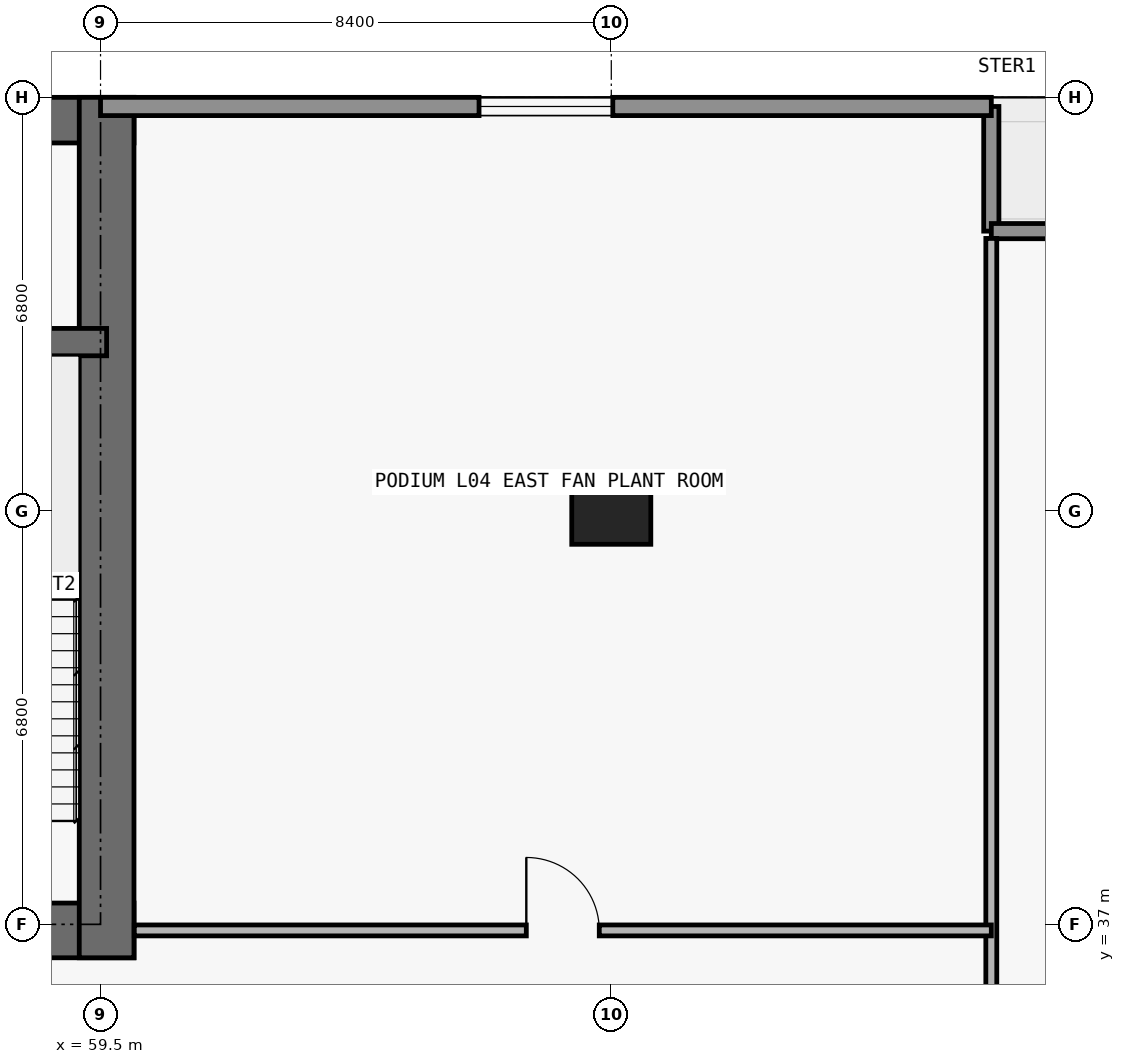
"""IFC4 building model, lengths in metres.
Left out: names, types, materials, properties, quantities, classifications, styles, units other than length and angle.
Written with IfcOpenShell. Run it as: python <this file> out.ifc"""

import sys

from ifc_helpers import new_model, si_unit, direction, frame, frame_2d, origin, origin_2d, place, context, subcontext, project, spatial, rectangle, extrude, element, fill, save


model = new_model("IFC4")
c1 = context("Model", 3, precision=1e-05, world=origin(), true_north=direction((0.0, 1.0)))
c2 = subcontext(c1, "Body", "Model", "MODEL_VIEW")
j1 = project(units=[si_unit("LENGTHUNIT", "METRE"), si_unit("PLANEANGLEUNIT", "RADIAN")], contexts=[c1])
p1 = place(None, origin())
s1 = spatial("IfcSite", under=j1, at=p1, CompositionType="ELEMENT")
p2 = place(p1, origin())
s2 = spatial("IfcBuilding", under=s1, at=p2, CompositionType="ELEMENT")
p3 = place(p2, frame((0.0, 0.0, 19.8)))
s3 = spatial("IfcBuildingStorey", under=s2, at=p3, CompositionType="ELEMENT", Elevation=19.8)
p4 = place(p3, frame((67.9, 43.8, 0.0), z_axis=(0.0, 0.0, 1.0), x_axis=(1.0, 0.0, 0.0)))
e1 = element("IfcColumn", 1, at=p4, inside=s3, PredefinedType="COLUMN", context=c2, shape_type="SweptSolid", body=[
    extrude(rectangle(XDim=1.3, YDim=1.1, at=origin_2d()), origin(), (0.0, 0.0, 1.0), 4.45),
])
p5 = place(p3, frame((17.75, 36.9, 0.0), z_axis=(0.0, 0.0, 1.0), x_axis=(1.0, 0.0, 0.0)))
e2 = element("IfcWall", 2, at=p5, inside=s3, PredefinedType="SHEAR", context=c2, shape_type="SweptSolid", body=[
    extrude(rectangle(XDim=42.3, YDim=0.9, at=frame_2d((21.15, 0.0))), origin(), (0.0, 0.0, 1.0), 4.45),
])
p6 = place(p5, frame((14.55, 0.0, 0.0)))
e3 = element("IfcOpeningElement", 3, at=p6, cuts=e2, PredefinedType="OPENING", context=c2, shape_type="SweptSolid", body=[
    extrude(rectangle(XDim=1.1, YDim=2.15, at=frame_2d((0.55, 1.075))), frame((0.0, 0.46, 0.0), z_axis=(0.0, -1.0, 0.0), x_axis=(1.0, 0.0, 0.0)), (0.0, 0.0, 1.0), 0.92),
])
p7 = place(p5, frame((6.4, 0.0, 0.0)))
e4 = element("IfcOpeningElement", 4, at=p7, cuts=e2, PredefinedType="OPENING", context=c2, shape_type="SweptSolid", body=[
    extrude(rectangle(XDim=1.05, YDim=2.15, at=frame_2d((0.525, 1.075))), frame((0.0, 0.46, 0.0), z_axis=(0.0, -1.0, 0.0), x_axis=(1.0, 0.0, 0.0)), (0.0, 0.0, 1.0), 0.92),
])
p8 = place(p5, frame((34.9, 0.0, 0.0)))
e5 = element("IfcOpeningElement", 5, at=p8, cuts=e2, PredefinedType="OPENING", context=c2, shape_type="SweptSolid", body=[
    extrude(rectangle(XDim=1.05, YDim=2.15, at=frame_2d((0.525, 1.075))), frame((0.0, 0.46, 0.0), z_axis=(0.0, -1.0, 0.0), x_axis=(1.0, 0.0, 0.0)), (0.0, 0.0, 1.0), 0.92),
])
p9 = place(p5, frame((11.012, 0.0, 0.0)))
e6 = element("IfcOpeningElement", 6, at=p9, cuts=e2, PredefinedType="OPENING", context=c2, shape_type="SweptSolid", body=[
    extrude(rectangle(XDim=1.05, YDim=2.15, at=frame_2d((0.525, 1.075))), frame((0.0, 0.46, 0.0), z_axis=(0.0, -1.0, 0.0), x_axis=(1.0, 0.0, 0.0)), (0.0, 0.0, 1.0), 0.92),
])
p10 = place(p5, frame((24.25, 0.0, 0.0)))
e7 = element("IfcOpeningElement", 7, at=p10, cuts=e2, PredefinedType="OPENING", context=c2, shape_type="SweptSolid", body=[
    extrude(rectangle(XDim=1.05, YDim=2.15, at=frame_2d((0.525, 1.075))), frame((0.0, 0.46, 0.0), z_axis=(0.0, -1.0, 0.0), x_axis=(1.0, 0.0, 0.0)), (0.0, 0.0, 1.0), 0.92),
])
p11 = place(p3, frame((17.75, 50.225, 0.0), z_axis=(0.0, 0.0, 1.0), x_axis=(1.0, 0.0, 0.0)))
e8 = element("IfcWall", 8, at=p11, inside=s3, PredefinedType="SHEAR", context=c2, shape_type="SweptSolid", body=[
    extrude(rectangle(XDim=42.3, YDim=0.75, at=frame_2d((21.15, 0.0))), origin(), (0.0, 0.0, 1.0), 4.45),
])
p12 = place(p3, frame((59.6, 36.45, 0.0), z_axis=(0.0, 0.0, 1.0), x_axis=(0.0, 1.0, 0.0)))
e9 = element("IfcWall", 9, at=p12, inside=s3, PredefinedType="SHEAR", context=c2, shape_type="SweptSolid", body=[
    extrude(rectangle(XDim=14.15, YDim=0.9, at=frame_2d((7.075, 0.0))), origin(), (0.0, 0.0, 1.0), 4.45),
])
p13 = place(p3, frame((18.2, 46.575, 0.0), z_axis=(0.0, 0.0, 1.0), x_axis=(1.0, 0.0, 0.0)))
e10 = element("IfcWall", 10, at=p13, inside=s3, PredefinedType="SHEAR", context=c2, shape_type="SweptSolid", body=[
    extrude(rectangle(XDim=41.4, YDim=0.45, at=frame_2d((20.7, 0.0))), origin(), (0.0, 0.0, 1.0), 4.45),
])
p14 = place(p13, frame((7.675, 0.0, 0.0)))
e11 = element("IfcOpeningElement", 11, at=p14, cuts=e10, PredefinedType="OPENING", context=c2, shape_type="SweptSolid", body=[
    extrude(rectangle(XDim=1.05, YDim=2.15, at=frame_2d((0.525, 1.075))), frame((0.0, 0.235, 0.0), z_axis=(0.0, -1.0, 0.0), x_axis=(1.0, 0.0, 0.0)), (0.0, 0.0, 1.0), 0.47),
])
p15 = place(p13, frame((32.725, 0.0, 0.0)))
e12 = element("IfcOpeningElement", 12, at=p15, cuts=e10, PredefinedType="OPENING", context=c2, shape_type="SweptSolid", body=[
    extrude(rectangle(XDim=1.05, YDim=2.15, at=frame_2d((0.525, 1.075))), frame((0.0, 0.235, 0.0), z_axis=(0.0, -1.0, 0.0), x_axis=(1.0, 0.0, 0.0)), (0.0, 0.0, 1.0), 0.47),
])
p16 = place(p3, frame((74.15, 50.45, 0.0), z_axis=(0.0, 0.0, 1.0), x_axis=(0.0, -1.0, 0.0)))
e13 = element("IfcWall", 13, at=p16, inside=s3, PredefinedType="ELEMENTEDWALL", context=c2, shape_type="SweptSolid", body=[
    extrude(rectangle(XDim=2.05, YDim=0.25, at=frame_2d((1.025, 0.0))), origin(), (0.0, 0.0, 1.0), 4.45),
])
p17 = place(p3, frame((74.15, 48.4, 0.0), z_axis=(0.0, 0.0, 1.0), x_axis=(1.0, 0.0, 0.0)))
e14 = element("IfcWall", 14, at=p17, inside=s3, PredefinedType="ELEMENTEDWALL", context=c2, shape_type="SweptSolid", body=[
    extrude(rectangle(XDim=2.25, YDim=0.25, at=frame_2d((1.125, 0.0))), origin(), (0.0, 0.0, 1.0), 4.45),
])
p18 = place(p3, frame((59.5, 50.45, 0.0), z_axis=(0.0, 0.0, 1.0), x_axis=(1.0, 0.0, 0.0)))
e15 = element("IfcWall", 15, at=p18, inside=s3, PredefinedType="STANDARD", context=c2, shape_type="SweptSolid", body=[
    extrude(rectangle(XDim=14.65, YDim=0.3, at=frame_2d((7.325, 0.0))), origin(), (0.0, 0.0, 1.0), 4.45),
])
p19 = place(p18, frame((6.225, 0.0, 0.85)))
e16 = element("IfcOpeningElement", 16, at=p19, cuts=e15, PredefinedType="OPENING", context=c2, shape_type="SweptSolid", body=[
    extrude(rectangle(XDim=2.2, YDim=1.55, at=frame_2d((1.1, 0.775))), frame((0.0, 0.16, 0.0), z_axis=(0.0, -1.0, 0.0), x_axis=(1.0, 0.0, 0.0)), (0.0, 0.0, 1.0), 0.32),
])
p20 = place(p3, frame((74.15, 22.84, 0.0), z_axis=(0.0, 0.0, 1.0), x_axis=(0.0, 1.0, 0.0)))
e17 = element("IfcWall", 17, at=p20, inside=s3, PredefinedType="PARTITIONING", context=c2, shape_type="SweptSolid", body=[
    extrude(rectangle(XDim=25.44, YDim=0.18, at=frame_2d((12.72, 0.0))), origin(), (0.0, 0.0, 1.0), 4.45),
])
p21 = place(p3, frame((60.055, 36.9, 0.0), z_axis=(0.0, 0.0, 1.0), x_axis=(1.0, 0.0, 0.0)))
e18 = element("IfcWall", 18, at=p21, inside=s3, PredefinedType="PARTITIONING", context=c2, shape_type="SweptSolid", body=[
    extrude(rectangle(XDim=14.095, YDim=0.18, at=frame_2d((7.047, 0.0))), origin(), (0.0, 0.0, 1.0), 4.45),
])
p22 = place(p21, frame((6.448, 0.0, 0.0)))
e19 = element("IfcOpeningElement", 19, at=p22, cuts=e18, PredefinedType="OPENING", context=c2, shape_type="SweptSolid", body=[
    extrude(rectangle(XDim=1.2, YDim=2.2, at=frame_2d((0.6, 1.1))), frame((0.0, 0.1, 0.0), z_axis=(0.0, -1.0, 0.0), x_axis=(1.0, 0.0, 0.0)), (0.0, 0.0, 1.0), 0.2),
])
p23 = place(p19, origin())
e20 = element("IfcWindow", 20, at=p23, inside=s3, PartitioningType="SINGLE_PANEL", PredefinedType="WINDOW", context=c2, shape_type="SweptSolid", body=[
    extrude(rectangle(XDim=2.2, YDim=1.55, at=frame_2d((1.1, 0.775))), frame((0.0, 0.03, 0.0), z_axis=(0.0, -1.0, 0.0), x_axis=(1.0, 0.0, 0.0)), (0.0, 0.0, 1.0), 0.06),
])
fill(e16, e20)
p24 = place(p22, origin())
e21 = element("IfcDoor", 21, at=p24, inside=s3, OperationType="SINGLE_SWING_LEFT", PredefinedType="DOOR", context=c2, shape_type="SweptSolid", body=[
    extrude(rectangle(XDim=1.2, YDim=2.2, at=frame_2d((0.6, 1.1))), frame((0.0, 0.025, 0.0), z_axis=(0.0, -1.0, 0.0), x_axis=(1.0, 0.0, 0.0)), (0.0, 0.0, 1.0), 0.05),
])
fill(e19, e21)
save(model, sys.argv[1])
